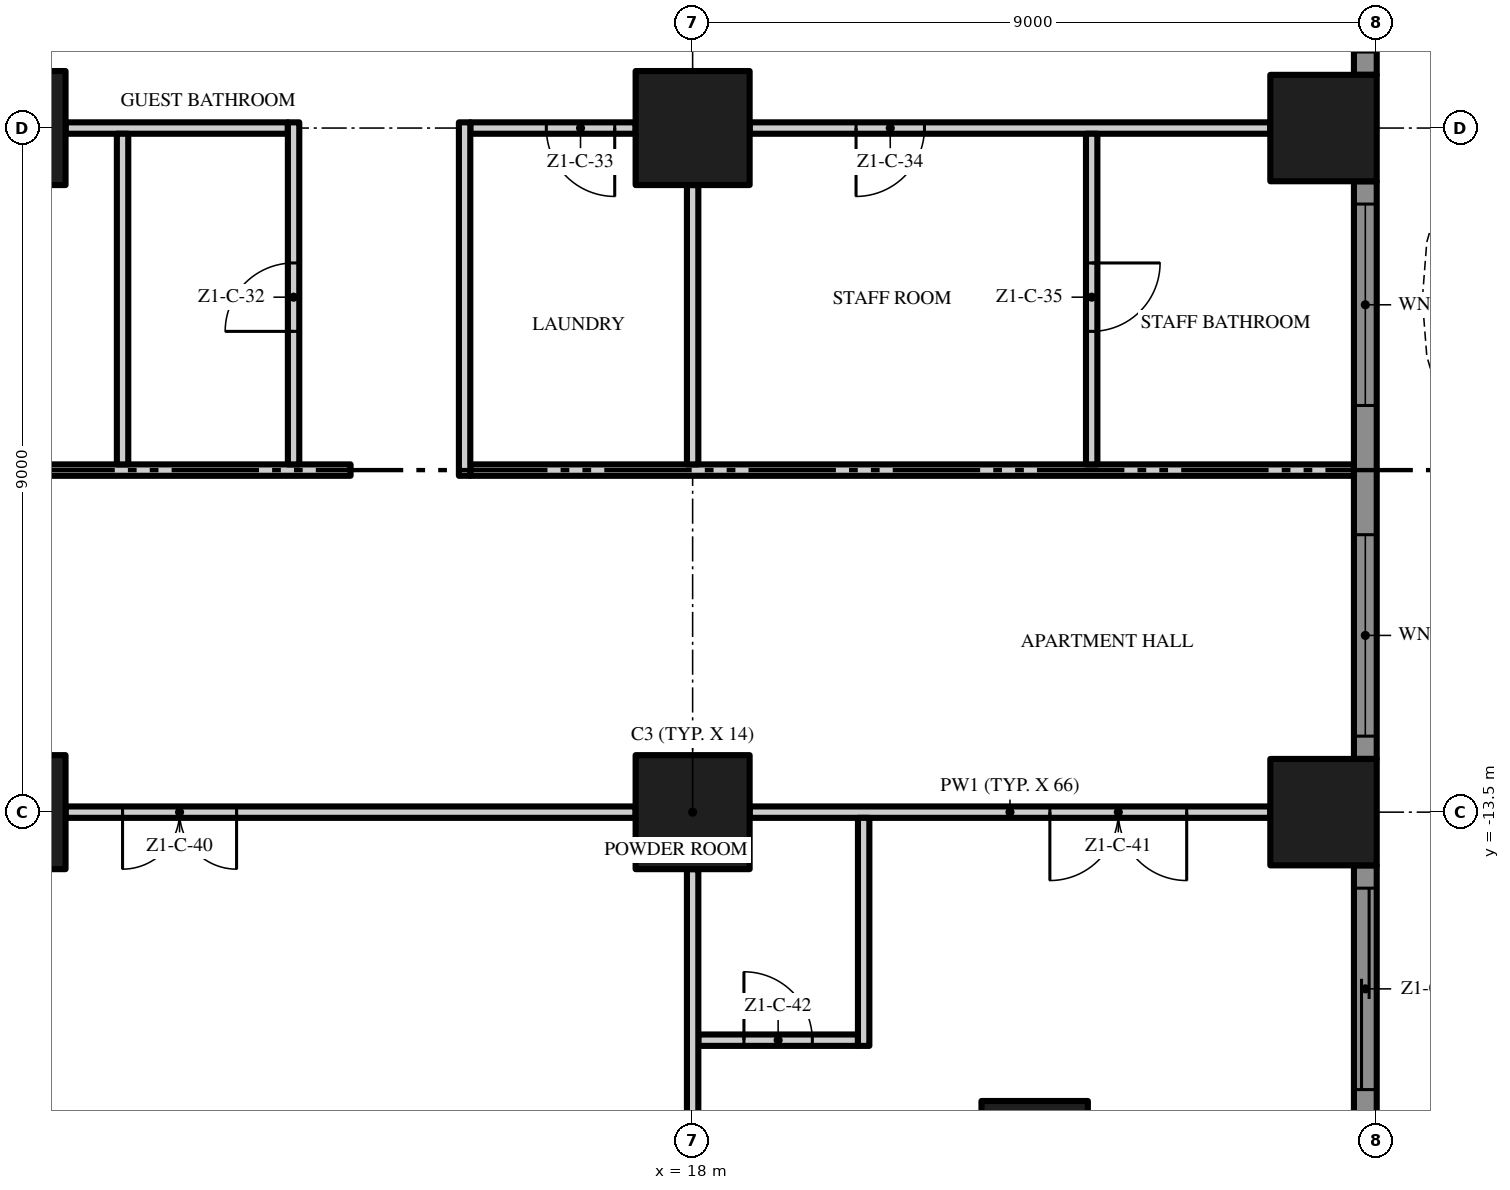
"""IFC4 building model, lengths in metres.
Left out: names, types, materials, properties, quantities, classifications, styles, units other than length and angle.
Written with IfcOpenShell. Run it as: python <this file> out.ifc"""

import sys

from ifc_helpers import new_model, si_unit, direction, frame, frame_2d, origin, origin_2d, place, context, subcontext, project, spatial, polyline, rectangle, outline, extrude, element, fill, save


model = new_model("IFC4")
c1 = context("Model", 3, precision=1e-05, world=origin(), true_north=direction((0.0, 1.0)))
c2 = subcontext(c1, "Body", "Model", "MODEL_VIEW")
j1 = project(units=[si_unit("LENGTHUNIT", "METRE"), si_unit("PLANEANGLEUNIT", "RADIAN")], contexts=[c1])
p1 = place(None, origin())
s1 = spatial("IfcSite", under=j1, at=p1, CompositionType="ELEMENT")
p2 = place(p1, origin())
s2 = spatial("IfcBuilding", under=s1, at=p2, CompositionType="ELEMENT")
p3 = place(p2, frame((0.0, 0.0, 45.4)))
s3 = spatial("IfcBuildingStorey", under=s2, at=p3, CompositionType="ELEMENT", Elevation=45.4)
for number, where, z_axis, x_axis in (
    (1, (18.0, -13.5, 0.0), (0.0, 0.0, 1.0), (1.0, 0.0, 0.0)),
    (2, (18.0, -4.5, 0.0), (0.0, 0.0, 1.0), (1.0, 0.0, 0.0)),
):
    element("IfcColumn", number, at=place(p3, frame(where, z_axis=z_axis, x_axis=x_axis)), inside=s3, PredefinedType="COLUMN", context=c2, shape_type="SweptSolid", body=[
        extrude(rectangle(XDim=1.5, YDim=1.5, at=origin_2d()), origin(), (0.0, 0.0, 1.0), 3.5),
    ])
for number, where, z_axis, x_axis in (
    (3, (26.3, -13.5, 0.0), (0.0, 0.0, 1.0), (1.0, 0.0, 0.0)),
    (4, (22.5, -18.0, 0.0), (0.0, 0.0, 1.0), (1.0, 0.0, 0.0)),
    (5, (26.3, -4.5, 0.0), (0.0, 0.0, 1.0), (1.0, 0.0, 0.0)),
):
    element("IfcColumn", number, at=place(p3, frame(where, z_axis=z_axis, x_axis=x_axis)), inside=s3, PredefinedType="COLUMN", context=c2, shape_type="SweptSolid", body=[
        extrude(rectangle(XDim=1.4, YDim=1.4, at=origin_2d()), origin(), (0.0, 0.0, 1.0), 3.5),
    ])
for number, where, z_axis, x_axis in (
    (6, (9.0, -13.5, 0.0), (0.0, 0.0, 1.0), (1.0, 0.0, 0.0)),
    (7, (9.0, -4.5, 0.0), (0.0, 0.0, 1.0), (1.0, 0.0, 0.0)),
):
    element("IfcColumn", number, at=place(p3, frame(where, z_axis=z_axis, x_axis=x_axis)), inside=s3, PredefinedType="COLUMN", context=c2, shape_type="SweptSolid", body=[
        extrude(rectangle(XDim=1.5, YDim=1.5, at=origin_2d()), origin(), (0.0, 0.0, 1.0), 3.5),
    ])
p4 = place(p3, frame((26.85, -14.2, 0.0), z_axis=(0.0, 0.0, 1.0), x_axis=(0.0, -1.0, 0.0)))
e8 = element("IfcWall", 8, at=p4, inside=s3, PredefinedType="SOLIDWALL", context=c2, shape_type="SweptSolid", body=[
    extrude(rectangle(XDim=3.5, YDim=0.3, at=frame_2d((1.75, 0.0))), origin(), (0.0, 0.0, 1.0), 3.5),
])
p5 = place(p4, frame((0.3, 0.0, 0.0)))
e9 = element("IfcOpeningElement", 9, at=p5, cuts=e8, PredefinedType="OPENING", context=c2, shape_type="SweptSolid", body=[
    extrude(rectangle(XDim=2.65, YDim=2.4, at=frame_2d((1.325, 1.2))), frame((0.0, 0.16, 0.0), z_axis=(0.0, -1.0, 0.0), x_axis=(1.0, 0.0, 0.0)), (0.0, 0.0, 1.0), 0.32),
])
p6 = place(p3, frame((26.85, -5.2, 0.0), z_axis=(0.0, 0.0, 1.0), x_axis=(0.0, -1.0, 0.0)))
e10 = element("IfcWall", 10, at=p6, inside=s3, PredefinedType="SOLIDWALL", context=c2, shape_type="SweptSolid", body=[
    extrude(rectangle(XDim=7.6, YDim=0.3, at=frame_2d((3.8, 0.0))), origin(), (0.0, 0.0, 1.0), 3.5),
])
p7 = place(p6, frame((4.65, 0.0, 0.45)))
e11 = element("IfcOpeningElement", 11, at=p7, cuts=e10, PredefinedType="OPENING", context=c2, shape_type="SweptSolid", body=[
    extrude(rectangle(XDim=2.65, YDim=2.65, at=frame_2d((1.325, 1.325))), frame((0.0, 0.16, 0.0), z_axis=(0.0, -1.0, 0.0), x_axis=(1.0, 0.0, 0.0)), (0.0, 0.0, 1.0), 0.32),
])
p8 = place(p6, frame((0.3, 0.0, 0.45)))
e12 = element("IfcOpeningElement", 12, at=p8, cuts=e10, PredefinedType="OPENING", context=c2, shape_type="SweptSolid", body=[
    extrude(rectangle(XDim=2.65, YDim=2.65, at=frame_2d((1.325, 1.325))), frame((0.0, 0.16, 0.0), z_axis=(0.0, -1.0, 0.0), x_axis=(1.0, 0.0, 0.0)), (0.0, 0.0, 1.0), 0.32),
])
p9 = place(p3, frame((26.85, 3.8, 0.0), z_axis=(0.0, 0.0, 1.0), x_axis=(0.0, -1.0, 0.0)))
e13 = element("IfcWall", 13, at=p9, inside=s3, PredefinedType="SOLIDWALL", context=c2, shape_type="SweptSolid", body=[
    extrude(rectangle(XDim=7.6, YDim=0.3, at=frame_2d((3.8, 0.0))), origin(), (0.0, 0.0, 1.0), 3.5),
])
p10 = place(p9, frame((4.65, 0.0, 0.45)))
e14 = element("IfcOpeningElement", 14, at=p10, cuts=e13, PredefinedType="OPENING", context=c2, shape_type="SweptSolid", body=[
    extrude(rectangle(XDim=2.65, YDim=2.65, at=frame_2d((1.325, 1.325))), frame((0.0, 0.16, 0.0), z_axis=(0.0, -1.0, 0.0), x_axis=(1.0, 0.0, 0.0)), (0.0, 0.0, 1.0), 0.32),
])
p11 = place(p9, frame((0.3, 0.0, 0.0)))
e15 = element("IfcOpeningElement", 15, at=p11, cuts=e13, PredefinedType="OPENING", context=c2, shape_type="SweptSolid", body=[
    extrude(rectangle(XDim=2.65, YDim=2.4, at=frame_2d((1.325, 1.2))), frame((0.0, 0.16, 0.0), z_axis=(0.0, -1.0, 0.0), x_axis=(1.0, 0.0, 0.0)), (0.0, 0.0, 1.0), 0.32),
])
p12 = place(p3, origin())
e16 = element("IfcWall", 16, at=p12, inside=s3, PredefinedType="USERDEFINED", context=c2, shape_type="SweptSolid", body=[
    extrude(outline(polyline([(28.8, -18.0), (29.505, -16.5), (29.941, -15.0), (30.0, -14.25), (29.941, -13.5), (29.505, -12.0), (28.8, -10.5), (28.095, -9.0), (27.659, -7.5), (27.6, -6.75), (27.659, -6.0), (28.095, -4.5), (28.8, -3.0), (29.505, -1.5), (29.941, 0.0), (30.0, 0.75), (29.941, 1.5), (29.505, 3.0), (28.8, 4.5), (28.095, 6.0), (27.659, 7.5), (27.6, 8.25), (27.659, 9.0), (28.095, 10.5), (28.8, 12.0), (29.505, 13.5), (29.941, 15.0), (30.0, 15.75), (29.941, 16.5), (29.505, 18.0), (29.265, 17.93), (29.694, 16.455), (29.749, 15.75), (29.694, 15.045), (29.271, 13.589), (28.574, 12.106), (27.86, 10.589), (27.411, 9.045), (27.349, 8.25), (27.411, 7.455), (27.86, 5.911), (28.574, 4.394), (29.271, 2.911), (29.694, 1.455), (29.749, 0.75), (29.694, 0.045), (29.271, -1.411), (28.574, -2.894), (27.86, -4.411), (27.411, -5.955), (27.349, -6.75), (27.411, -7.545), (27.86, -9.089), (28.574, -10.606), (29.271, -12.089), (29.694, -13.545), (29.749, -14.25), (29.694, -14.955), (29.271, -16.411), (28.574, -17.894), (28.8, -18.0)])), origin(), (0.0, 0.0, 1.0), 0.9),
])
p13 = place(p3, frame((18.075, -16.5, 0.0), z_axis=(0.0, 0.0, 1.0), x_axis=(1.0, 0.0, 0.0)))
e17 = element("IfcWall", 17, at=p13, inside=s3, PredefinedType="PARTITIONING", context=c2, shape_type="SweptSolid", body=[
    extrude(rectangle(XDim=2.1, YDim=0.15, at=frame_2d((1.05, 0.0))), origin(), (0.0, 0.0, 1.0), 3.5),
])
p14 = place(p13, frame((0.6, 0.0, 0.0)))
e18 = element("IfcOpeningElement", 18, at=p14, cuts=e17, PredefinedType="OPENING", context=c2, shape_type="SweptSolid", body=[
    extrude(rectangle(XDim=0.9, YDim=2.1, at=frame_2d((0.45, 1.05))), frame((0.0, 0.085, 0.0), z_axis=(0.0, -1.0, 0.0), x_axis=(1.0, 0.0, 0.0)), (0.0, 0.0, 1.0), 0.17),
])
p15 = place(p3, frame((17.25, -13.5, 0.0), z_axis=(0.0, 0.0, 1.0), x_axis=(-1.0, 0.0, 0.0)))
e19 = element("IfcWall", 19, at=p15, inside=s3, PredefinedType="PARTITIONING", context=c2, shape_type="SweptSolid", body=[
    extrude(rectangle(XDim=7.5, YDim=0.15, at=frame_2d((3.75, 0.0))), origin(), (0.0, 0.0, 1.0), 3.5),
])
p16 = place(p15, frame((5.25, 0.0, 0.0)))
e20 = element("IfcOpeningElement", 20, at=p16, cuts=e19, PredefinedType="OPENING", context=c2, shape_type="SweptSolid", body=[
    extrude(rectangle(XDim=1.5, YDim=2.4, at=frame_2d((0.75, 1.2))), frame((0.0, 0.085, 0.0), z_axis=(0.0, -1.0, 0.0), x_axis=(1.0, 0.0, 0.0)), (0.0, 0.0, 1.0), 0.17),
])
p17 = place(p3, frame((25.6, -13.5, 0.0), z_axis=(0.0, 0.0, 1.0), x_axis=(-1.0, 0.0, 0.0)))
e21 = element("IfcWall", 21, at=p17, inside=s3, PredefinedType="PARTITIONING", context=c2, shape_type="SweptSolid", body=[
    extrude(rectangle(XDim=6.85, YDim=0.15, at=frame_2d((3.425, 0.0))), origin(), (0.0, 0.0, 1.0), 3.5),
])
p18 = place(p17, frame((1.1, 0.0, 0.0)))
e22 = element("IfcOpeningElement", 22, at=p18, cuts=e21, PredefinedType="OPENING", context=c2, shape_type="SweptSolid", body=[
    extrude(rectangle(XDim=1.8, YDim=2.4, at=frame_2d((0.9, 1.2))), frame((0.0, 0.085, 0.0), z_axis=(0.0, -1.0, 0.0), x_axis=(1.0, 0.0, 0.0)), (0.0, 0.0, 1.0), 0.17),
])
p19 = place(p3, frame((0.1, -9.0, 0.0), z_axis=(0.0, 0.0, 1.0), x_axis=(1.0, 0.0, 0.0)))
e23 = element("IfcWall", 23, at=p19, inside=s3, PredefinedType="PARTITIONING", context=c2, shape_type="SweptSolid", body=[
    extrude(rectangle(XDim=13.4, YDim=0.15, at=frame_2d((6.7, 0.0))), origin(), (0.0, 0.0, 1.0), 3.5),
])
p20 = place(p19, frame((0.4, 0.0, 0.0)))
e24 = element("IfcOpeningElement", 24, at=p20, cuts=e23, PredefinedType="OPENING", context=c2, shape_type="SweptSolid", body=[
    extrude(rectangle(XDim=0.8, YDim=2.0, at=frame_2d((0.4, 1.0))), frame((0.0, 0.085, 0.0), z_axis=(0.0, -1.0, 0.0), x_axis=(1.0, 0.0, 0.0)), (0.0, 0.0, 1.0), 0.17),
])
p21 = place(p19, frame((6.9, 0.0, 0.0)))
e25 = element("IfcOpeningElement", 25, at=p21, cuts=e23, PredefinedType="OPENING", context=c2, shape_type="SweptSolid", body=[
    extrude(rectangle(XDim=1.0, YDim=2.4, at=frame_2d((0.5, 1.2))), frame((0.0, 0.085, 0.0), z_axis=(0.0, -1.0, 0.0), x_axis=(1.0, 0.0, 0.0)), (0.0, 0.0, 1.0), 0.17),
])
p22 = place(p3, frame((15.075, -9.0, 0.0), z_axis=(0.0, 0.0, 1.0), x_axis=(1.0, 0.0, 0.0)))
e26 = element("IfcWall", 26, at=p22, inside=s3, PredefinedType="PARTITIONING", context=c2, shape_type="SweptSolid", body=[
    extrude(rectangle(XDim=11.625, YDim=0.15, at=frame_2d((5.812, 0.0))), origin(), (0.0, 0.0, 1.0), 3.5),
])
p23 = place(p3, frame((9.75, -4.5, 0.0), z_axis=(0.0, 0.0, 1.0), x_axis=(1.0, 0.0, 0.0)))
e27 = element("IfcWall", 27, at=p23, inside=s3, PredefinedType="PARTITIONING", context=c2, shape_type="SweptSolid", body=[
    extrude(rectangle(XDim=2.925, YDim=0.15, at=frame_2d((1.462, 0.0))), origin(), (0.0, 0.0, 1.0), 3.5),
])
p24 = place(p3, frame((17.25, -4.5, 0.0), z_axis=(0.0, 0.0, 1.0), x_axis=(-1.0, 0.0, 0.0)))
e28 = element("IfcWall", 28, at=p24, inside=s3, PredefinedType="PARTITIONING", context=c2, shape_type="SweptSolid", body=[
    extrude(rectangle(XDim=2.175, YDim=0.15, at=frame_2d((1.087, 0.0))), origin(), (0.0, 0.0, 1.0), 3.5),
])
p25 = place(p24, frame((0.275, 0.0, 0.0)))
e29 = element("IfcOpeningElement", 29, at=p25, cuts=e28, PredefinedType="OPENING", context=c2, shape_type="SweptSolid", body=[
    extrude(rectangle(XDim=0.9, YDim=2.1, at=frame_2d((0.45, 1.05))), frame((0.0, 0.085, 0.0), z_axis=(0.0, -1.0, 0.0), x_axis=(1.0, 0.0, 0.0)), (0.0, 0.0, 1.0), 0.17),
])
p26 = place(p3, frame((25.6, -4.5, 0.0), z_axis=(0.0, 0.0, 1.0), x_axis=(-1.0, 0.0, 0.0)))
e30 = element("IfcWall", 30, at=p26, inside=s3, PredefinedType="PARTITIONING", context=c2, shape_type="SweptSolid", body=[
    extrude(rectangle(XDim=6.85, YDim=0.15, at=frame_2d((3.425, 0.0))), origin(), (0.0, 0.0, 1.0), 3.5),
])
p27 = place(p26, frame((4.55, 0.0, 0.0)))
e31 = element("IfcOpeningElement", 31, at=p27, cuts=e30, PredefinedType="OPENING", context=c2, shape_type="SweptSolid", body=[
    extrude(rectangle(XDim=0.9, YDim=2.1, at=frame_2d((0.45, 1.05))), frame((0.0, 0.085, 0.0), z_axis=(0.0, -1.0, 0.0), x_axis=(1.0, 0.0, 0.0)), (0.0, 0.0, 1.0), 0.17),
])
p28 = place(p3, frame((10.5, -8.925, 0.0), z_axis=(0.0, 0.0, 1.0), x_axis=(0.0, 1.0, 0.0)))
e32 = element("IfcWall", 32, at=p28, inside=s3, PredefinedType="PARTITIONING", context=c2, shape_type="SweptSolid", body=[
    extrude(rectangle(XDim=4.35, YDim=0.15, at=frame_2d((2.175, 0.0))), origin(), (0.0, 0.0, 1.0), 3.5),
])
p29 = place(p3, frame((12.75, -8.925, 0.0), z_axis=(0.0, 0.0, 1.0), x_axis=(0.0, 1.0, 0.0)))
e33 = element("IfcWall", 33, at=p29, inside=s3, PredefinedType="PARTITIONING", context=c2, shape_type="SweptSolid", body=[
    extrude(rectangle(XDim=4.5, YDim=0.15, at=frame_2d((2.25, 0.0))), origin(), (0.0, 0.0, 1.0), 3.5),
])
p30 = place(p29, frame((1.75, 0.0, 0.0)))
e34 = element("IfcOpeningElement", 34, at=p30, cuts=e33, PredefinedType="OPENING", context=c2, shape_type="SweptSolid", body=[
    extrude(rectangle(XDim=0.9, YDim=2.1, at=frame_2d((0.45, 1.05))), frame((0.0, 0.085, 0.0), z_axis=(0.0, -1.0, 0.0), x_axis=(1.0, 0.0, 0.0)), (0.0, 0.0, 1.0), 0.17),
])
p31 = place(p3, frame((15.0, -9.075, 0.0), z_axis=(0.0, 0.0, 1.0), x_axis=(0.0, 1.0, 0.0)))
e35 = element("IfcWall", 35, at=p31, inside=s3, PredefinedType="PARTITIONING", context=c2, shape_type="SweptSolid", body=[
    extrude(rectangle(XDim=4.65, YDim=0.15, at=frame_2d((2.325, 0.0))), origin(), (0.0, 0.0, 1.0), 3.5),
])
p32 = place(p3, frame((18.0, -21.1, 0.0), z_axis=(0.0, 0.0, 1.0), x_axis=(0.0, 1.0, 0.0)))
e36 = element("IfcWall", 36, at=p32, inside=s3, PredefinedType="PARTITIONING", context=c2, shape_type="SweptSolid", body=[
    extrude(rectangle(XDim=6.85, YDim=0.15, at=frame_2d((3.425, 0.0))), origin(), (0.0, 0.0, 1.0), 3.5),
])
p33 = place(p3, frame((18.0, -8.925, 0.0), z_axis=(0.0, 0.0, 1.0), x_axis=(0.0, 1.0, 0.0)))
e37 = element("IfcWall", 37, at=p33, inside=s3, PredefinedType="PARTITIONING", context=c2, shape_type="SweptSolid", body=[
    extrude(rectangle(XDim=3.675, YDim=0.15, at=frame_2d((1.837, 0.0))), origin(), (0.0, 0.0, 1.0), 3.5),
])
p34 = place(p3, frame((20.25, -16.575, 0.0), z_axis=(0.0, 0.0, 1.0), x_axis=(0.0, 1.0, 0.0)))
e38 = element("IfcWall", 38, at=p34, inside=s3, PredefinedType="PARTITIONING", context=c2, shape_type="SweptSolid", body=[
    extrude(rectangle(XDim=3.0, YDim=0.15, at=frame_2d((1.5, 0.0))), origin(), (0.0, 0.0, 1.0), 3.5),
])
p35 = place(p3, frame((23.25, -4.575, 0.0), z_axis=(0.0, 0.0, 1.0), x_axis=(0.0, -1.0, 0.0)))
e39 = element("IfcWall", 39, at=p35, inside=s3, PredefinedType="PARTITIONING", context=c2, shape_type="SweptSolid", body=[
    extrude(rectangle(XDim=4.35, YDim=0.15, at=frame_2d((2.175, 0.0))), origin(), (0.0, 0.0, 1.0), 3.5),
])
p36 = place(p35, frame((1.7, 0.0, 0.0)))
e40 = element("IfcOpeningElement", 40, at=p36, cuts=e39, PredefinedType="OPENING", context=c2, shape_type="SweptSolid", body=[
    extrude(rectangle(XDim=0.9, YDim=2.1, at=frame_2d((0.45, 1.05))), frame((0.0, 0.085, 0.0), z_axis=(0.0, -1.0, 0.0), x_axis=(1.0, 0.0, 0.0)), (0.0, 0.0, 1.0), 0.17),
])
p37 = place(p5, origin())
e41 = element("IfcDoor", 41, at=p37, inside=s3, OperationType="SINGLE_SWING_LEFT", PredefinedType="DOOR", context=c2, shape_type="SweptSolid", body=[
    extrude(rectangle(XDim=2.65, YDim=2.4, at=frame_2d((1.325, 1.2))), frame((0.0, 0.025, 0.0), z_axis=(0.0, -1.0, 0.0), x_axis=(1.0, 0.0, 0.0)), (0.0, 0.0, 1.0), 0.05),
])
fill(e9, e41)
p38 = place(p7, origin())
e42 = element("IfcWindow", 42, at=p38, inside=s3, PartitioningType="SINGLE_PANEL", PredefinedType="WINDOW", context=c2, shape_type="SweptSolid", body=[
    extrude(rectangle(XDim=2.65, YDim=2.65, at=frame_2d((1.325, 1.325))), frame((0.0, 0.03, 0.0), z_axis=(0.0, -1.0, 0.0), x_axis=(1.0, 0.0, 0.0)), (0.0, 0.0, 1.0), 0.06),
])
fill(e11, e42)
p39 = place(p8, origin())
e43 = element("IfcWindow", 43, at=p39, inside=s3, PartitioningType="SINGLE_PANEL", PredefinedType="WINDOW", context=c2, shape_type="SweptSolid", body=[
    extrude(rectangle(XDim=2.65, YDim=2.65, at=frame_2d((1.325, 1.325))), frame((0.0, 0.03, 0.0), z_axis=(0.0, -1.0, 0.0), x_axis=(1.0, 0.0, 0.0)), (0.0, 0.0, 1.0), 0.06),
])
fill(e12, e43)
p40 = place(p10, origin())
e44 = element("IfcWindow", 44, at=p40, inside=s3, PartitioningType="SINGLE_PANEL", PredefinedType="WINDOW", context=c2, shape_type="SweptSolid", body=[
    extrude(rectangle(XDim=2.65, YDim=2.65, at=frame_2d((1.325, 1.325))), frame((0.0, 0.03, 0.0), z_axis=(0.0, -1.0, 0.0), x_axis=(1.0, 0.0, 0.0)), (0.0, 0.0, 1.0), 0.06),
])
fill(e14, e44)
p41 = place(p30, origin())
e45 = element("IfcDoor", 45, at=p41, inside=s3, OperationType="SINGLE_SWING_LEFT", PredefinedType="DOOR", context=c2, shape_type="SweptSolid", body=[
    extrude(rectangle(XDim=0.9, YDim=2.1, at=frame_2d((0.45, 1.05))), frame((0.0, 0.025, 0.0), z_axis=(0.0, -1.0, 0.0), x_axis=(1.0, 0.0, 0.0)), (0.0, 0.0, 1.0), 0.05),
])
fill(e34, e45)
p42 = place(p25, origin())
e46 = element("IfcDoor", 46, at=p42, inside=s3, OperationType="SINGLE_SWING_LEFT", PredefinedType="DOOR", context=c2, shape_type="SweptSolid", body=[
    extrude(rectangle(XDim=0.9, YDim=2.1, at=frame_2d((0.45, 1.05))), frame((0.0, 0.025, 0.0), z_axis=(0.0, -1.0, 0.0), x_axis=(1.0, 0.0, 0.0)), (0.0, 0.0, 1.0), 0.05),
])
fill(e29, e46)
p43 = place(p27, origin())
e47 = element("IfcDoor", 47, at=p43, inside=s3, OperationType="SINGLE_SWING_RIGHT", PredefinedType="DOOR", context=c2, shape_type="SweptSolid", body=[
    extrude(rectangle(XDim=0.9, YDim=2.1, at=frame_2d((0.45, 1.05))), frame((0.0, 0.025, 0.0), z_axis=(0.0, -1.0, 0.0), x_axis=(1.0, 0.0, 0.0)), (0.0, 0.0, 1.0), 0.05),
])
fill(e31, e47)
p44 = place(p36, origin())
e48 = element("IfcDoor", 48, at=p44, inside=s3, OperationType="SINGLE_SWING_LEFT", PredefinedType="DOOR", context=c2, shape_type="SweptSolid", body=[
    extrude(rectangle(XDim=0.9, YDim=2.1, at=frame_2d((0.45, 1.05))), frame((0.0, 0.025, 0.0), z_axis=(0.0, -1.0, 0.0), x_axis=(1.0, 0.0, 0.0)), (0.0, 0.0, 1.0), 0.05),
])
fill(e40, e48)
p45 = place(p16, origin())
e49 = element("IfcDoor", 49, at=p45, inside=s3, OperationType="DOUBLE_DOOR_SINGLE_SWING", PredefinedType="DOOR", context=c2, shape_type="SweptSolid", body=[
    extrude(rectangle(XDim=1.5, YDim=2.4, at=frame_2d((0.75, 1.2))), frame((0.0, 0.025, 0.0), z_axis=(0.0, -1.0, 0.0), x_axis=(1.0, 0.0, 0.0)), (0.0, 0.0, 1.0), 0.05),
])
fill(e20, e49)
p46 = place(p18, origin())
e50 = element("IfcDoor", 50, at=p46, inside=s3, OperationType="DOUBLE_DOOR_SINGLE_SWING", PredefinedType="DOOR", context=c2, shape_type="SweptSolid", body=[
    extrude(rectangle(XDim=1.8, YDim=2.4, at=frame_2d((0.9, 1.2))), frame((0.0, 0.025, 0.0), z_axis=(0.0, -1.0, 0.0), x_axis=(1.0, 0.0, 0.0)), (0.0, 0.0, 1.0), 0.05),
])
fill(e22, e50)
p47 = place(p14, origin())
e51 = element("IfcDoor", 51, at=p47, inside=s3, OperationType="SINGLE_SWING_LEFT", PredefinedType="DOOR", context=c2, shape_type="SweptSolid", body=[
    extrude(rectangle(XDim=0.9, YDim=2.1, at=frame_2d((0.45, 1.05))), frame((0.0, 0.025, 0.0), z_axis=(0.0, -1.0, 0.0), x_axis=(1.0, 0.0, 0.0)), (0.0, 0.0, 1.0), 0.05),
])
fill(e18, e51)
save(model, sys.argv[1])
